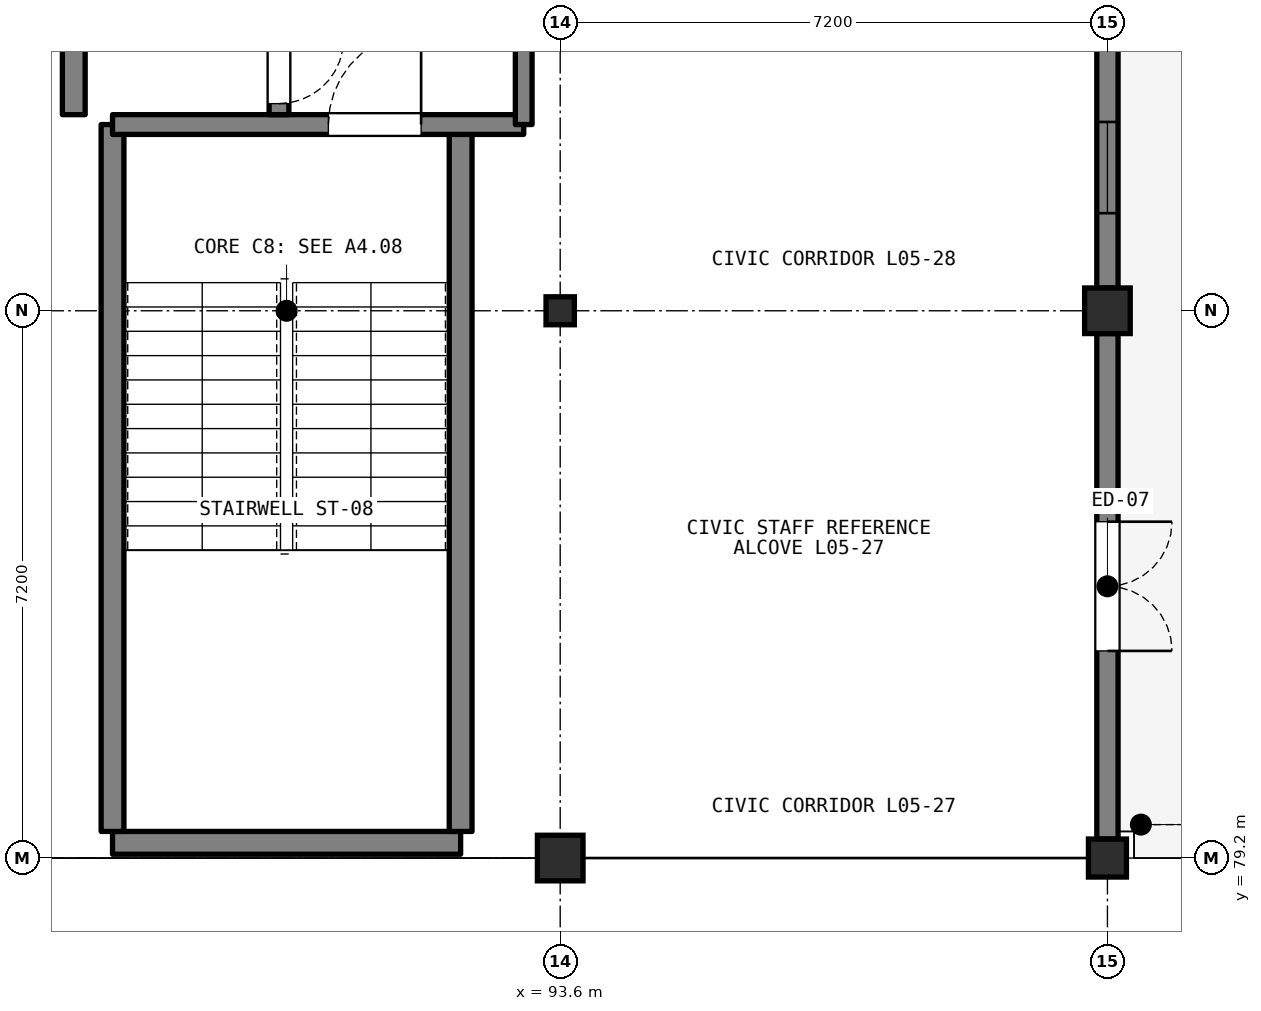
"""IFC4 building model, lengths in metres.
Left out: names, types, materials, properties, quantities, classifications, styles, units other than length and angle.
Written with IfcOpenShell. Run it as: python <this file> out.ifc"""

import sys

from ifc_helpers import new_model, si_unit, direction, frame, frame_2d, origin, origin_2d, place, context, subcontext, project, spatial, rectangle, i_section, extrude, element, fill, save


model = new_model("IFC4")
c1 = context("Model", 3, precision=1e-05, world=origin(), true_north=direction((0.0, 1.0)))
c2 = subcontext(c1, "Body", "Model", "MODEL_VIEW")
j1 = project(units=[si_unit("LENGTHUNIT", "METRE"), si_unit("PLANEANGLEUNIT", "RADIAN")], contexts=[c1])
p1 = place(None, origin())
s1 = spatial("IfcSite", under=j1, at=p1, CompositionType="ELEMENT")
p2 = place(p1, origin())
s2 = spatial("IfcBuilding", under=s1, at=p2, CompositionType="ELEMENT")
p3 = place(p2, frame((0.0, 0.0, 18.0)))
s3 = spatial("IfcBuildingStorey", under=s2, at=p3, CompositionType="ELEMENT", Elevation=18.0)
p4 = place(p3, frame((93.6, 79.2, 0.0), z_axis=(0.0, 0.0, 1.0), x_axis=(1.0, 0.0, 0.0)))
e1 = element("IfcColumn", 1, at=p4, inside=s3, PredefinedType="COLUMN", context=c2, shape_type="SweptSolid", body=[
    extrude(rectangle(XDim=0.6, YDim=0.6, at=origin_2d()), origin(), (0.0, 0.0, 1.0), 3.9),
])
p5 = place(p3, frame((93.6, 86.4, 0.0), z_axis=(0.0, 0.0, 1.0), x_axis=(1.0, 0.0, 0.0)))
e2 = element("IfcColumn", 2, at=p5, inside=s3, PredefinedType="COLUMN", context=c2, shape_type="SweptSolid", body=[
    extrude(i_section(OverallWidth=0.373, OverallDepth=0.368, WebThickness=0.015, FlangeThickness=0.024, FilletRadius=0.015, at=origin_2d()), origin(), (0.0, 0.0, 1.0), 3.9),
])
p6 = place(p3, frame((100.8, 79.2, 0.0), z_axis=(0.0, 0.0, 1.0), x_axis=(1.0, 0.0, 0.0)))
e3 = element("IfcColumn", 3, at=p6, inside=s3, PredefinedType="COLUMN", context=c2, shape_type="SweptSolid", body=[
    extrude(rectangle(XDim=0.5, YDim=0.5, at=origin_2d()), origin(), (0.0, 0.0, 1.0), 3.9),
])
p7 = place(p3, frame((100.8, 86.4, 0.0), z_axis=(0.0, 0.0, 1.0), x_axis=(1.0, 0.0, 0.0)))
e4 = element("IfcColumn", 4, at=p7, inside=s3, PredefinedType="COLUMN", context=c2, shape_type="SweptSolid", body=[
    extrude(rectangle(XDim=0.6, YDim=0.6, at=origin_2d()), origin(), (0.0, 0.0, 1.0), 3.9),
])
p8 = place(p3, frame((100.8, 86.1, 0.0), z_axis=(0.0, 0.0, 1.0), x_axis=(0.0, -1.0, 0.0)))
e5 = element("IfcWall", 5, at=p8, inside=s3, PredefinedType="SOLIDWALL", context=c2, shape_type="SweptSolid", body=[
    extrude(rectangle(XDim=6.65, YDim=0.28, at=frame_2d((3.325, 0.0))), origin(), (0.0, 0.0, 1.0), 3.172),
])
p9 = place(p8, frame((2.475, 0.0, 0.0)))
e6 = element("IfcOpeningElement", 6, at=p9, cuts=e5, PredefinedType="OPENING", context=c2, shape_type="SweptSolid", body=[
    extrude(rectangle(XDim=1.7, YDim=2.25, at=frame_2d((0.85, 1.125))), frame((0.0, 0.15, 0.0), z_axis=(0.0, -1.0, 0.0), x_axis=(1.0, 0.0, 0.0)), (0.0, 0.0, 1.0), 0.3),
])
p10 = place(p3, frame((100.8, 93.3, 0.0), z_axis=(0.0, 0.0, 1.0), x_axis=(0.0, -1.0, 0.0)))
e7 = element("IfcWall", 7, at=p10, inside=s3, PredefinedType="SOLIDWALL", context=c2, shape_type="SweptSolid", body=[
    extrude(rectangle(XDim=6.6, YDim=0.28, at=frame_2d((3.3, 0.0))), origin(), (0.0, 0.0, 1.0), 3.192),
])
p11 = place(p10, frame((0.984, 0.0, 0.95)))
e8 = element("IfcOpeningElement", 8, at=p11, cuts=e7, PredefinedType="OPENING", context=c2, shape_type="SweptSolid", body=[
    extrude(rectangle(XDim=1.2, YDim=1.7, at=frame_2d((0.6, 0.85))), frame((0.0, 0.15, 0.0), z_axis=(0.0, -1.0, 0.0), x_axis=(1.0, 0.0, 0.0)), (0.0, 0.0, 1.0), 0.3),
])
p12 = place(p10, frame((4.416, 0.0, 0.95)))
e9 = element("IfcOpeningElement", 9, at=p12, cuts=e7, PredefinedType="OPENING", context=c2, shape_type="SweptSolid", body=[
    extrude(rectangle(XDim=1.2, YDim=1.7, at=frame_2d((0.6, 0.85))), frame((0.0, 0.15, 0.0), z_axis=(0.0, -1.0, 0.0), x_axis=(1.0, 0.0, 0.0)), (0.0, 0.0, 1.0), 0.3),
])
p13 = place(p3, frame((87.71, 79.4, 0.0), z_axis=(0.0, 0.0, 1.0), x_axis=(1.0, 0.0, 0.0)))
e10 = element("IfcWall", 10, at=p13, inside=s3, PredefinedType="SHEAR", context=c2, shape_type="SweptSolid", body=[
    extrude(rectangle(XDim=4.58, YDim=0.3, at=frame_2d((2.29, 0.0))), origin(), (0.0, 0.0, 1.0), 3.72),
])
for number, where, z_axis, x_axis in (
    (11, (87.71, 79.55, 0.0), (0.0, 0.0, 1.0), (0.0, 1.0, 0.0)),
    (12, (92.29, 79.55, 0.0), (0.0, 0.0, 1.0), (0.0, 1.0, 0.0)),
):
    element("IfcWall", number, at=place(p3, frame(where, z_axis=z_axis, x_axis=x_axis)), inside=s3, PredefinedType="SHEAR", context=c2, shape_type="SweptSolid", body=[
        extrude(rectangle(XDim=9.3, YDim=0.3, at=frame_2d((4.65, 0.0))), origin(), (0.0, 0.0, 1.0), 3.72),
    ])
p14 = place(p3, frame((87.71, 88.85, 0.0), z_axis=(0.0, 0.0, 1.0), x_axis=(1.0, 0.0, 0.0)))
e13 = element("IfcWall", 13, at=p14, inside=s3, PredefinedType="SHEAR", context=c2, shape_type="SweptSolid", body=[
    extrude(rectangle(XDim=5.41, YDim=0.26, at=frame_2d((2.705, 0.0))), origin(), (0.0, 0.0, 1.0), 3.72),
])
p15 = place(p14, frame((2.84, 0.0, 0.0)))
e14 = element("IfcOpeningElement", 14, at=p15, cuts=e13, PredefinedType="OPENING", context=c2, shape_type="SweptSolid", body=[
    extrude(rectangle(XDim=1.22, YDim=2.15, at=frame_2d((0.61, 1.075))), frame((0.0, 0.14, 0.0), z_axis=(0.0, -1.0, 0.0), x_axis=(1.0, 0.0, 0.0)), (0.0, 0.0, 1.0), 0.28),
])
p16 = place(p3, frame((87.2, 88.98, 0.0), z_axis=(0.0, 0.0, 1.0), x_axis=(0.0, 1.0, 0.0)))
e15 = element("IfcWall", 15, at=p16, inside=s3, PredefinedType="SHEAR", context=c2, shape_type="SweptSolid", body=[
    extrude(rectangle(XDim=4.32, YDim=0.3, at=frame_2d((2.16, 0.0))), origin(), (0.0, 0.0, 1.0), 3.72),
])
p17 = place(p3, frame((89.9, 93.3, 0.0), z_axis=(0.0, 0.0, 1.0), x_axis=(0.0, -1.0, 0.0)))
e16 = element("IfcWall", 16, at=p17, inside=s3, PredefinedType="SHEAR", context=c2, shape_type="SweptSolid", body=[
    extrude(rectangle(XDim=4.32, YDim=0.26, at=frame_2d((2.16, 0.0))), origin(), (0.0, 0.0, 1.0), 3.72),
])
p18 = place(p17, frame((1.0, 0.0, 0.0)))
e17 = element("IfcOpeningElement", 17, at=p18, cuts=e16, PredefinedType="OPENING", context=c2, shape_type="SweptSolid", body=[
    extrude(rectangle(XDim=1.2, YDim=2.15, at=frame_2d((0.6, 1.075))), frame((0.0, 0.14, 0.0), z_axis=(0.0, -1.0, 0.0), x_axis=(1.0, 0.0, 0.0)), (0.0, 0.0, 1.0), 0.28),
])
p19 = place(p17, frame((3.325, 0.0, 0.0)))
e18 = element("IfcOpeningElement", 18, at=p19, cuts=e16, PredefinedType="OPENING", context=c2, shape_type="SweptSolid", body=[
    extrude(rectangle(XDim=0.85, YDim=2.05, at=frame_2d((0.425, 1.025))), frame((0.0, 0.14, 0.0), z_axis=(0.0, -1.0, 0.0), x_axis=(1.0, 0.0, 0.0)), (0.0, 0.0, 1.0), 0.28),
])
p20 = place(p3, frame((93.12, 93.3, 0.0), z_axis=(0.0, 0.0, 1.0), x_axis=(0.0, -1.0, 0.0)))
e19 = element("IfcWall", 19, at=p20, inside=s3, PredefinedType="SHEAR", context=c2, shape_type="SweptSolid", body=[
    extrude(rectangle(XDim=4.45, YDim=0.22, at=frame_2d((2.225, 0.0))), origin(), (0.0, 0.0, 1.0), 3.72),
])
p21 = place(p20, frame((1.55, 0.0, 0.0)))
e20 = element("IfcOpeningElement", 20, at=p21, cuts=e19, PredefinedType="OPENING", context=c2, shape_type="SweptSolid", body=[
    extrude(rectangle(XDim=1.6, YDim=2.2, at=frame_2d((0.8, 1.1))), frame((0.0, 0.12, 0.0), z_axis=(0.0, -1.0, 0.0), x_axis=(1.0, 0.0, 0.0)), (0.0, 0.0, 1.0), 0.24),
])
p22 = place(p9, origin())
e21 = element("IfcDoor", 21, at=p22, inside=s3, OperationType="DOUBLE_DOOR_SINGLE_SWING", PredefinedType="DOOR", context=c2, shape_type="SweptSolid", body=[
    extrude(rectangle(XDim=1.7, YDim=2.25, at=frame_2d((0.85, 1.125))), frame((0.0, 0.025, 0.0), z_axis=(0.0, -1.0, 0.0), x_axis=(1.0, 0.0, 0.0)), (0.0, 0.0, 1.0), 0.05),
])
fill(e6, e21)
p23 = place(p12, origin())
e22 = element("IfcWindow", 22, at=p23, inside=s3, PartitioningType="SINGLE_PANEL", PredefinedType="WINDOW", context=c2, shape_type="SweptSolid", body=[
    extrude(rectangle(XDim=1.2, YDim=1.7, at=frame_2d((0.6, 0.85))), frame((0.0, 0.03, 0.0), z_axis=(0.0, -1.0, 0.0), x_axis=(1.0, 0.0, 0.0)), (0.0, 0.0, 1.0), 0.06),
])
fill(e9, e22)
p24 = place(p15, origin())
e23 = element("IfcDoor", 23, at=p24, inside=s3, OperationType="SINGLE_SWING_RIGHT", PredefinedType="DOOR", context=c2, shape_type="SweptSolid", body=[
    extrude(rectangle(XDim=1.22, YDim=2.15, at=frame_2d((0.61, 1.075))), frame((0.0, 0.025, 0.0), z_axis=(0.0, -1.0, 0.0), x_axis=(1.0, 0.0, 0.0)), (0.0, 0.0, 1.0), 0.05),
])
fill(e14, e23)
p25 = place(p19, origin())
e24 = element("IfcDoor", 24, at=p25, inside=s3, OperationType="SINGLE_SWING_LEFT", PredefinedType="DOOR", context=c2, shape_type="SweptSolid", body=[
    extrude(rectangle(XDim=0.85, YDim=2.05, at=frame_2d((0.425, 1.025))), frame((0.0, 0.025, 0.0), z_axis=(0.0, -1.0, 0.0), x_axis=(1.0, 0.0, 0.0)), (0.0, 0.0, 1.0), 0.05),
])
fill(e18, e24)
save(model, sys.argv[1])
